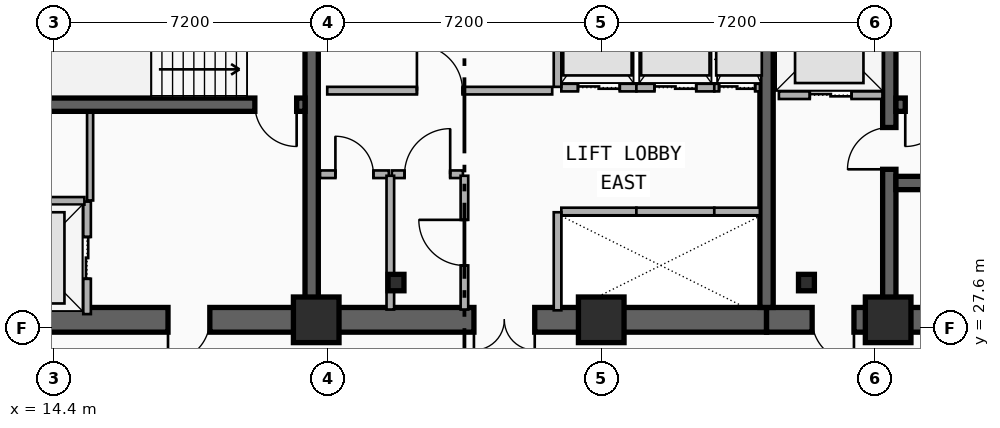
"""IFC4 building model, lengths in metres.
Left out: names, types, materials, properties, quantities, classifications, styles, units other than length and angle.
Written with IfcOpenShell. Run it as: python <this file> out.ifc"""

import sys

from ifc_helpers import new_model, si_unit, direction, frame, frame_2d, origin, origin_2d, place, context, subcontext, project, spatial, rectangle, i_section, extrude, element, fill, save


model = new_model("IFC4")
c1 = context("Model", 3, precision=1e-05, world=origin(), true_north=direction((0.0, 1.0)))
c2 = subcontext(c1, "Body", "Model", "MODEL_VIEW")
j1 = project(units=[si_unit("LENGTHUNIT", "METRE"), si_unit("PLANEANGLEUNIT", "RADIAN")], contexts=[c1])
p1 = place(None, origin())
s1 = spatial("IfcSite", under=j1, at=p1, CompositionType="ELEMENT")
p2 = place(p1, origin())
s2 = spatial("IfcBuilding", under=s1, at=p2, CompositionType="ELEMENT")
p3 = place(p2, frame((0.0, 0.0, 115.3)))
s3 = spatial("IfcBuildingStorey", under=s2, at=p3, CompositionType="ELEMENT", Elevation=115.3)
p4 = place(p3, frame((21.18, 27.82, 0.0), z_axis=(0.0, 0.0, 1.0), x_axis=(-1.0, 0.0, 0.0)))
e1 = element("IfcWall", 1, at=p4, inside=s3, PredefinedType="SHEAR", context=c2, shape_type="SweptSolid", body=[
    extrude(rectangle(XDim=9.03, YDim=0.65, at=frame_2d((4.515, 0.0))), origin(), (0.0, 0.0, 1.0), 3.5),
])
p5 = place(p4, frame((2.68, 0.0, 0.0)))
e2 = element("IfcOpeningElement", 2, at=p5, cuts=e1, PredefinedType="OPENING", context=c2, shape_type="SweptSolid", body=[
    extrude(rectangle(XDim=1.1, YDim=2.15, at=frame_2d((0.55, 1.075))), frame((0.0, 0.335, 0.0), z_axis=(0.0, -1.0, 0.0), x_axis=(1.0, 0.0, 0.0)), (0.0, 0.0, 1.0), 0.67),
])
p6 = place(p3, frame((33.15, 27.82, 0.0), z_axis=(0.0, 0.0, 1.0), x_axis=(-1.0, 0.0, 0.0)))
e3 = element("IfcWall", 3, at=p6, inside=s3, PredefinedType="SHEAR", context=c2, shape_type="SweptSolid", body=[
    extrude(rectangle(XDim=11.97, YDim=0.65, at=frame_2d((5.985, 0.0))), origin(), (0.0, 0.0, 1.0), 3.5),
])
p7 = place(p6, frame((6.1, 0.0, 0.0)))
e4 = element("IfcOpeningElement", 4, at=p7, cuts=e3, PredefinedType="OPENING", context=c2, shape_type="SweptSolid", body=[
    extrude(rectangle(XDim=1.6, YDim=2.2, at=frame_2d((0.8, 1.1))), frame((0.0, 0.335, 0.0), z_axis=(0.0, -1.0, 0.0), x_axis=(1.0, 0.0, 0.0)), (0.0, 0.0, 1.0), 0.67),
])
p8 = place(p3, frame((45.38, 27.82, 0.0), z_axis=(0.0, 0.0, 1.0), x_axis=(-1.0, 0.0, 0.0)))
e5 = element("IfcWall", 5, at=p8, inside=s3, PredefinedType="SHEAR", context=c2, shape_type="SweptSolid", body=[
    extrude(rectangle(XDim=12.23, YDim=0.65, at=frame_2d((6.115, 0.0))), origin(), (0.0, 0.0, 1.0), 3.5),
])
p9 = place(p8, frame((9.93, 0.0, 0.0)))
e6 = element("IfcOpeningElement", 6, at=p9, cuts=e5, PredefinedType="OPENING", context=c2, shape_type="SweptSolid", body=[
    extrude(rectangle(XDim=1.1, YDim=2.15, at=frame_2d((0.55, 1.075))), frame((0.0, 0.335, 0.0), z_axis=(0.0, -1.0, 0.0), x_axis=(1.0, 0.0, 0.0)), (0.0, 0.0, 1.0), 0.67),
])
p10 = place(p8, frame((6.23, 0.0, 0.0)))
e7 = element("IfcOpeningElement", 7, at=p10, cuts=e5, PredefinedType="OPENING", context=c2, shape_type="SweptSolid", body=[
    extrude(rectangle(XDim=1.1, YDim=2.15, at=frame_2d((0.55, 1.075))), frame((0.0, 0.335, 0.0), z_axis=(0.0, -1.0, 0.0), x_axis=(1.0, 0.0, 0.0)), (0.0, 0.0, 1.0), 0.67),
])
for number, where, z_axis, x_axis in (
    (8, (21.18, 28.145, 0.0), (0.0, 0.0, 1.0), (0.0, 1.0, 0.0)),
    (9, (33.15, 28.145, 0.0), (0.0, 0.0, 1.0), (0.0, 1.0, 0.0)),
):
    element("IfcWall", number, at=place(p3, frame(where, z_axis=z_axis, x_axis=x_axis)), inside=s3, PredefinedType="SHEAR", context=c2, shape_type="SweptSolid", body=[
        extrude(rectangle(XDim=8.58, YDim=0.35, at=frame_2d((4.29, 0.0))), origin(), (0.0, 0.0, 1.0), 3.5),
    ])
p11 = place(p3, frame((36.38, 28.145, 0.0), z_axis=(0.0, 0.0, 1.0), x_axis=(0.0, 1.0, 0.0)))
e10 = element("IfcWall", 10, at=p11, inside=s3, PredefinedType="SHEAR", context=c2, shape_type="SweptSolid", body=[
    extrude(rectangle(XDim=8.58, YDim=0.35, at=frame_2d((4.29, 0.0))), origin(), (0.0, 0.0, 1.0), 3.5),
])
p12 = place(p11, frame((3.635, 0.0, 0.0)))
e11 = element("IfcOpeningElement", 11, at=p12, cuts=e10, PredefinedType="OPENING", context=c2, shape_type="SweptSolid", body=[
    extrude(rectangle(XDim=1.1, YDim=2.15, at=frame_2d((0.55, 1.075))), frame((0.0, 0.185, 0.0), z_axis=(0.0, -1.0, 0.0), x_axis=(1.0, 0.0, 0.0)), (0.0, 0.0, 1.0), 0.37),
])
p13 = place(p3, frame((21.005, 33.48, 0.0), z_axis=(0.0, 0.0, 1.0), x_axis=(-1.0, 0.0, 0.0)))
e12 = element("IfcWall", 12, at=p13, inside=s3, PredefinedType="SHEAR", context=c2, shape_type="SweptSolid", body=[
    extrude(rectangle(XDim=8.53, YDim=0.35, at=frame_2d((4.265, 0.0))), origin(), (0.0, 0.0, 1.0), 3.5),
])
p14 = place(p13, frame((0.22, 0.0, 0.0)))
e13 = element("IfcOpeningElement", 13, at=p14, cuts=e12, PredefinedType="OPENING", context=c2, shape_type="SweptSolid", body=[
    extrude(rectangle(XDim=1.1, YDim=2.15, at=frame_2d((0.55, 1.075))), frame((0.0, 0.185, 0.0), z_axis=(0.0, -1.0, 0.0), x_axis=(1.0, 0.0, 0.0)), (0.0, 0.0, 1.0), 0.37),
])
p15 = place(p3, frame((45.055, 33.48, 0.0), z_axis=(0.0, 0.0, 1.0), x_axis=(-1.0, 0.0, 0.0)))
e14 = element("IfcWall", 14, at=p15, inside=s3, PredefinedType="SHEAR", context=c2, shape_type="SweptSolid", body=[
    extrude(rectangle(XDim=8.5, YDim=0.35, at=frame_2d((4.25, 0.0))), origin(), (0.0, 0.0, 1.0), 3.5),
])
p16 = place(p15, frame((7.155, 0.0, 0.0)))
e15 = element("IfcOpeningElement", 15, at=p16, cuts=e14, PredefinedType="OPENING", context=c2, shape_type="SweptSolid", body=[
    extrude(rectangle(XDim=1.1, YDim=2.15, at=frame_2d((0.55, 1.075))), frame((0.0, 0.185, 0.0), z_axis=(0.0, -1.0, 0.0), x_axis=(1.0, 0.0, 0.0)), (0.0, 0.0, 1.0), 0.37),
])
p17 = place(p3, frame((36.555, 31.42, 0.0), z_axis=(0.0, 0.0, 1.0), x_axis=(1.0, 0.0, 0.0)))
e16 = element("IfcWall", 16, at=p17, inside=s3, PredefinedType="SHEAR", context=c2, shape_type="SweptSolid", body=[
    extrude(rectangle(XDim=8.5, YDim=0.35, at=frame_2d((4.25, 0.0))), origin(), (0.0, 0.0, 1.0), 3.5),
])
for number, where, z_axis, x_axis in (
    (17, (23.4, 28.8, 0.0), (0.0, 0.0, 1.0), (1.0, 0.0, 0.0)),
    (18, (34.2, 28.8, 0.0), (0.0, 0.0, 1.0), (1.0, 0.0, 0.0)),
):
    element("IfcColumn", number, at=place(p3, frame(where, z_axis=z_axis, x_axis=x_axis)), inside=s3, PredefinedType="COLUMN", context=c2, shape_type="SweptSolid", body=[
        extrude(i_section(OverallWidth=0.418, OverallDepth=0.432, WebThickness=0.035, FlangeThickness=0.056, FilletRadius=0.015, at=origin_2d()), origin(), (0.0, 0.0, 1.0), 3.5),
    ])
for number, where, z_axis, x_axis in (
    (19, (21.3, 27.82, 0.0), (0.0, 0.0, 1.0), (1.0, 0.0, 0.0)),
    (20, (28.8, 27.82, 0.0), (0.0, 0.0, 1.0), (1.0, 0.0, 0.0)),
    (21, (36.35, 27.82, 0.0), (0.0, 0.0, 1.0), (1.0, 0.0, 0.0)),
):
    element("IfcColumn", number, at=place(p3, frame(where, z_axis=z_axis, x_axis=x_axis)), inside=s3, PredefinedType="COLUMN", context=c2, shape_type="SweptSolid", body=[
        extrude(rectangle(XDim=1.2, YDim=1.2, at=origin_2d()), origin(), (0.0, 0.0, 1.0), 3.5),
    ])
p18 = place(p3, frame((15.27, 27.97, 0.0), z_axis=(0.0, 0.0, 1.0), x_axis=(0.0, 1.0, 0.0)))
e22 = element("IfcWall", 22, at=p18, inside=s3, PredefinedType="PARTITIONING", context=c2, shape_type="SweptSolid", body=[
    extrude(rectangle(XDim=2.96, YDim=0.2, at=frame_2d((1.48, 0.0))), origin(), (0.0, 0.0, 1.0), 2.212),
])
p19 = place(p18, frame((0.93, 0.0, 0.0)))
e23 = element("IfcOpeningElement", 23, at=p19, cuts=e22, PredefinedType="OPENING", context=c2, shape_type="SweptSolid", body=[
    extrude(rectangle(XDim=1.1, YDim=2.15, at=frame_2d((0.55, 1.075))), frame((0.0, 0.11, 0.0), z_axis=(0.0, -1.0, 0.0), x_axis=(1.0, 0.0, 0.0)), (0.0, 0.0, 1.0), 0.22),
])
p20 = place(p3, frame((12.45, 30.95, 0.0), z_axis=(0.0, 0.0, 1.0), x_axis=(1.0, 0.0, 0.0)))
e24 = element("IfcWall", 24, at=p20, inside=s3, PredefinedType="PARTITIONING", context=c2, shape_type="SweptSolid", body=[
    extrude(rectangle(XDim=2.75, YDim=0.2, at=frame_2d((1.375, 0.0))), origin(), (0.0, 0.0, 1.0), 2.212),
])
p21 = place(p3, frame((33.475, 33.73, 0.0), z_axis=(0.0, 0.0, 1.0), x_axis=(1.0, 0.0, 0.0)))
e25 = element("IfcWall", 25, at=p21, inside=s3, PredefinedType="PARTITIONING", context=c2, shape_type="SweptSolid", body=[
    extrude(rectangle(XDim=2.725, YDim=0.2, at=frame_2d((1.362, 0.0))), origin(), (0.0, 0.0, 1.0), 2.212),
])
p22 = place(p21, frame((0.812, 0.0, 0.0)))
e26 = element("IfcOpeningElement", 26, at=p22, cuts=e25, PredefinedType="OPENING", context=c2, shape_type="SweptSolid", body=[
    extrude(rectangle(XDim=1.1, YDim=2.15, at=frame_2d((0.55, 1.075))), frame((0.0, 0.11, 0.0), z_axis=(0.0, -1.0, 0.0), x_axis=(1.0, 0.0, 0.0)), (0.0, 0.0, 1.0), 0.22),
])
p23 = place(p3, frame((27.75, 30.67, 0.0), z_axis=(0.0, 0.0, 1.0), x_axis=(1.0, 0.0, 0.0)))
e27 = element("IfcWall", 27, at=p23, inside=s3, PredefinedType="PARTITIONING", context=c2, shape_type="SweptSolid", body=[
    extrude(rectangle(XDim=1.975, YDim=0.2, at=frame_2d((0.988, 0.0))), origin(), (0.0, 0.0, 1.0), 2.212),
])
p24 = place(p3, frame((27.65, 28.07, 0.0), z_axis=(0.0, 0.0, 1.0), x_axis=(0.0, 1.0, 0.0)))
e28 = element("IfcWall", 28, at=p24, inside=s3, PredefinedType="PARTITIONING", context=c2, shape_type="SweptSolid", body=[
    extrude(rectangle(XDim=2.58, YDim=0.2, at=frame_2d((1.29, 0.0))), origin(), (0.0, 0.0, 1.0), 2.212),
])
p25 = place(p3, frame((29.725, 30.67, 0.0), z_axis=(0.0, 0.0, 1.0), x_axis=(1.0, 0.0, 0.0)))
e29 = element("IfcWall", 29, at=p25, inside=s3, PredefinedType="PARTITIONING", context=c2, shape_type="SweptSolid", body=[
    extrude(rectangle(XDim=2.05, YDim=0.2, at=frame_2d((1.025, 0.0))), origin(), (0.0, 0.0, 1.0), 2.62),
])
p26 = place(p3, frame((31.775, 30.67, 0.0), z_axis=(0.0, 0.0, 1.0), x_axis=(1.0, 0.0, 0.0)))
e30 = element("IfcWall", 30, at=p26, inside=s3, PredefinedType="PARTITIONING", context=c2, shape_type="SweptSolid", body=[
    extrude(rectangle(XDim=1.2, YDim=0.2, at=frame_2d((0.6, 0.0))), origin(), (0.0, 0.0, 1.0), 2.62),
])
p27 = place(p3, frame((27.75, 33.93, 0.0), z_axis=(0.0, 0.0, 1.0), x_axis=(1.0, 0.0, 0.0)))
e31 = element("IfcWall", 31, at=p27, inside=s3, PredefinedType="PARTITIONING", context=c2, shape_type="SweptSolid", body=[
    extrude(rectangle(XDim=1.975, YDim=0.2, at=frame_2d((0.988, 0.0))), origin(), (0.0, 0.0, 1.0), 2.212),
])
p28 = place(p27, frame((0.438, 0.0, 0.0)))
e32 = element("IfcOpeningElement", 32, at=p28, cuts=e31, PredefinedType="OPENING", context=c2, shape_type="SweptSolid", body=[
    extrude(rectangle(XDim=1.1, YDim=2.15, at=frame_2d((0.55, 1.075))), frame((0.0, 0.11, 0.0), z_axis=(0.0, -1.0, 0.0), x_axis=(1.0, 0.0, 0.0)), (0.0, 0.0, 1.0), 0.22),
])
p29 = place(p3, frame((27.65, 33.95, 0.0), z_axis=(0.0, 0.0, 1.0), x_axis=(0.0, 1.0, 0.0)))
e33 = element("IfcWall", 33, at=p29, inside=s3, PredefinedType="PARTITIONING", context=c2, shape_type="SweptSolid", body=[
    extrude(rectangle(XDim=2.68, YDim=0.2, at=frame_2d((1.34, 0.0))), origin(), (0.0, 0.0, 1.0), 2.212),
])
p30 = place(p3, frame((29.725, 33.93, 0.0), z_axis=(0.0, 0.0, 1.0), x_axis=(1.0, 0.0, 0.0)))
e34 = element("IfcWall", 34, at=p30, inside=s3, PredefinedType="PARTITIONING", context=c2, shape_type="SweptSolid", body=[
    extrude(rectangle(XDim=2.05, YDim=0.2, at=frame_2d((1.025, 0.0))), origin(), (0.0, 0.0, 1.0), 3.24),
])
p31 = place(p30, frame((0.475, 0.0, 0.0)))
e35 = element("IfcOpeningElement", 35, at=p31, cuts=e34, PredefinedType="OPENING", context=c2, shape_type="SweptSolid", body=[
    extrude(rectangle(XDim=1.1, YDim=2.15, at=frame_2d((0.55, 1.075))), frame((0.0, 0.11, 0.0), z_axis=(0.0, -1.0, 0.0), x_axis=(1.0, 0.0, 0.0)), (0.0, 0.0, 1.0), 0.22),
])
p32 = place(p3, frame((31.775, 33.93, 0.0), z_axis=(0.0, 0.0, 1.0), x_axis=(1.0, 0.0, 0.0)))
e36 = element("IfcWall", 36, at=p32, inside=s3, PredefinedType="PARTITIONING", context=c2, shape_type="SweptSolid", body=[
    extrude(rectangle(XDim=1.2, YDim=0.2, at=frame_2d((0.6, 0.0))), origin(), (0.0, 0.0, 1.0), 3.24),
])
p33 = place(p32, frame((0.125, 0.0, 0.0)))
e37 = element("IfcOpeningElement", 37, at=p33, cuts=e36, PredefinedType="OPENING", context=c2, shape_type="SweptSolid", body=[
    extrude(rectangle(XDim=0.95, YDim=2.15, at=frame_2d((0.475, 1.075))), frame((0.0, 0.11, 0.0), z_axis=(0.0, -1.0, 0.0), x_axis=(1.0, 0.0, 0.0)), (0.0, 0.0, 1.0), 0.22),
])
p34 = place(p3, frame((21.4, 31.65, 0.0), z_axis=(0.0, 0.0, 1.0), x_axis=(1.0, 0.0, 0.0)))
e38 = element("IfcWall", 38, at=p34, inside=s3, PredefinedType="PARTITIONING", context=c2, shape_type="SweptSolid", body=[
    extrude(rectangle(XDim=1.81, YDim=0.2, at=frame_2d((0.905, 0.0))), origin(), (0.0, 0.0, 1.0), 2.28),
])
p35 = place(p34, frame((0.405, 0.0, 0.0)))
e39 = element("IfcOpeningElement", 39, at=p35, cuts=e38, PredefinedType="OPENING", context=c2, shape_type="SweptSolid", body=[
    extrude(rectangle(XDim=1.0, YDim=2.15, at=frame_2d((0.5, 1.075))), frame((0.0, 0.11, 0.0), z_axis=(0.0, -1.0, 0.0), x_axis=(1.0, 0.0, 0.0)), (0.0, 0.0, 1.0), 0.22),
])
p36 = place(p3, frame((23.29, 31.65, 0.0), z_axis=(0.0, 0.0, 1.0), x_axis=(1.0, 0.0, 0.0)))
e40 = element("IfcWall", 40, at=p36, inside=s3, PredefinedType="PARTITIONING", context=c2, shape_type="SweptSolid", body=[
    extrude(rectangle(XDim=1.87, YDim=0.2, at=frame_2d((0.935, 0.0))), origin(), (0.0, 0.0, 1.0), 3.24),
])
p37 = place(p36, frame((0.335, 0.0, 0.0)))
e41 = element("IfcOpeningElement", 41, at=p37, cuts=e40, PredefinedType="OPENING", context=c2, shape_type="SweptSolid", body=[
    extrude(rectangle(XDim=1.2, YDim=2.15, at=frame_2d((0.6, 1.075))), frame((0.0, 0.11, 0.0), z_axis=(0.0, -1.0, 0.0), x_axis=(1.0, 0.0, 0.0)), (0.0, 0.0, 1.0), 0.22),
])
p38 = place(p3, frame((21.59, 33.85, 0.0), z_axis=(0.0, 0.0, 1.0), x_axis=(1.0, 0.0, 0.0)))
e42 = element("IfcWall", 42, at=p38, inside=s3, PredefinedType="PARTITIONING", context=c2, shape_type="SweptSolid", body=[
    extrude(rectangle(XDim=5.92, YDim=0.2, at=frame_2d((2.96, 0.0))), origin(), (0.0, 0.0, 1.0), 2.28),
])
p39 = place(p38, frame((2.36, 0.0, 0.0)))
e43 = element("IfcOpeningElement", 43, at=p39, cuts=e42, PredefinedType="OPENING", context=c2, shape_type="SweptSolid", body=[
    extrude(rectangle(XDim=1.2, YDim=2.15, at=frame_2d((0.6, 1.075))), frame((0.0, 0.11, 0.0), z_axis=(0.0, -1.0, 0.0), x_axis=(1.0, 0.0, 0.0)), (0.0, 0.0, 1.0), 0.22),
])
p40 = place(p3, frame((25.2, 28.09, 0.0), z_axis=(0.0, 0.0, 1.0), x_axis=(0.0, 1.0, 0.0)))
e44 = element("IfcWall", 44, at=p40, inside=s3, PredefinedType="PARTITIONING", context=c2, shape_type="SweptSolid", body=[
    extrude(rectangle(XDim=3.52, YDim=0.2, at=frame_2d((1.76, 0.0))), origin(), (0.0, 0.0, 1.0), 2.62),
])
p41 = place(p40, frame((1.16, 0.0, 0.0)))
e45 = element("IfcOpeningElement", 45, at=p41, cuts=e44, PredefinedType="OPENING", context=c2, shape_type="SweptSolid", body=[
    extrude(rectangle(XDim=1.2, YDim=2.15, at=frame_2d((0.6, 1.075))), frame((0.0, 0.11, 0.0), z_axis=(0.0, -1.0, 0.0), x_axis=(1.0, 0.0, 0.0)), (0.0, 0.0, 1.0), 0.22),
])
p42 = place(p3, frame((23.25, 28.09, 0.0), z_axis=(0.0, 0.0, 1.0), x_axis=(0.0, 1.0, 0.0)))
e46 = element("IfcWall", 46, at=p42, inside=s3, PredefinedType="PARTITIONING", context=c2, shape_type="SweptSolid", body=[
    extrude(rectangle(XDim=3.52, YDim=0.2, at=frame_2d((1.76, 0.0))), origin(), (0.0, 0.0, 1.0), 2.62),
])
p43 = place(p3, frame((15.35, 30.96, 0.0), z_axis=(0.0, 0.0, 1.0), x_axis=(0.0, 1.0, 0.0)))
e47 = element("IfcWall", 47, at=p43, inside=s3, PredefinedType="PARTITIONING", context=c2, shape_type="SweptSolid", body=[
    extrude(rectangle(XDim=2.31, YDim=0.16, at=frame_2d((1.155, 0.0))), origin(), (0.0, 0.0, 1.0), 3.24),
])
p44 = place(p19, origin())
e48 = element("IfcDoor", 48, at=p44, inside=s3, OperationType="DOUBLE_DOOR_SLIDING", PredefinedType="DOOR", context=c2, shape_type="SweptSolid", body=[
    extrude(rectangle(XDim=1.1, YDim=2.15, at=frame_2d((0.55, 1.075))), frame((0.0, 0.025, 0.0), z_axis=(0.0, -1.0, 0.0), x_axis=(1.0, 0.0, 0.0)), (0.0, 0.0, 1.0), 0.05),
])
fill(e23, e48)
p45 = place(p22, origin())
e49 = element("IfcDoor", 49, at=p45, inside=s3, OperationType="DOUBLE_DOOR_SLIDING", PredefinedType="DOOR", context=c2, shape_type="SweptSolid", body=[
    extrude(rectangle(XDim=1.1, YDim=2.15, at=frame_2d((0.55, 1.075))), frame((0.0, 0.025, 0.0), z_axis=(0.0, -1.0, 0.0), x_axis=(1.0, 0.0, 0.0)), (0.0, 0.0, 1.0), 0.05),
])
fill(e26, e49)
p46 = place(p28, origin())
e50 = element("IfcDoor", 50, at=p46, inside=s3, OperationType="DOUBLE_DOOR_SLIDING", PredefinedType="DOOR", context=c2, shape_type="SweptSolid", body=[
    extrude(rectangle(XDim=1.1, YDim=2.15, at=frame_2d((0.55, 1.075))), frame((0.0, 0.025, 0.0), z_axis=(0.0, -1.0, 0.0), x_axis=(1.0, 0.0, 0.0)), (0.0, 0.0, 1.0), 0.05),
])
fill(e32, e50)
p47 = place(p31, origin())
e51 = element("IfcDoor", 51, at=p47, inside=s3, OperationType="DOUBLE_DOOR_SLIDING", PredefinedType="DOOR", context=c2, shape_type="SweptSolid", body=[
    extrude(rectangle(XDim=1.1, YDim=2.15, at=frame_2d((0.55, 1.075))), frame((0.0, 0.025, 0.0), z_axis=(0.0, -1.0, 0.0), x_axis=(1.0, 0.0, 0.0)), (0.0, 0.0, 1.0), 0.05),
])
fill(e35, e51)
p48 = place(p33, origin())
e52 = element("IfcDoor", 52, at=p48, inside=s3, OperationType="DOUBLE_DOOR_SLIDING", PredefinedType="DOOR", context=c2, shape_type="SweptSolid", body=[
    extrude(rectangle(XDim=0.95, YDim=2.15, at=frame_2d((0.475, 1.075))), frame((0.0, 0.025, 0.0), z_axis=(0.0, -1.0, 0.0), x_axis=(1.0, 0.0, 0.0)), (0.0, 0.0, 1.0), 0.05),
])
fill(e37, e52)
p49 = place(p14, origin())
e53 = element("IfcDoor", 53, at=p49, inside=s3, OperationType="SINGLE_SWING_LEFT", PredefinedType="DOOR", context=c2, shape_type="SweptSolid", body=[
    extrude(rectangle(XDim=1.1, YDim=2.15, at=frame_2d((0.55, 1.075))), frame((0.0, 0.025, 0.0), z_axis=(0.0, -1.0, 0.0), x_axis=(1.0, 0.0, 0.0)), (0.0, 0.0, 1.0), 0.05),
])
fill(e13, e53)
p50 = place(p5, origin())
e54 = element("IfcDoor", 54, at=p50, inside=s3, OperationType="SINGLE_SWING_RIGHT", PredefinedType="DOOR", context=c2, shape_type="SweptSolid", body=[
    extrude(rectangle(XDim=1.1, YDim=2.15, at=frame_2d((0.55, 1.075))), frame((0.0, 0.025, 0.0), z_axis=(0.0, -1.0, 0.0), x_axis=(1.0, 0.0, 0.0)), (0.0, 0.0, 1.0), 0.05),
])
fill(e2, e54)
p51 = place(p16, origin())
e55 = element("IfcDoor", 55, at=p51, inside=s3, OperationType="SINGLE_SWING_RIGHT", PredefinedType="DOOR", context=c2, shape_type="SweptSolid", body=[
    extrude(rectangle(XDim=1.1, YDim=2.15, at=frame_2d((0.55, 1.075))), frame((0.0, 0.025, 0.0), z_axis=(0.0, -1.0, 0.0), x_axis=(1.0, 0.0, 0.0)), (0.0, 0.0, 1.0), 0.05),
])
fill(e15, e55)
p52 = place(p12, origin())
e56 = element("IfcDoor", 56, at=p52, inside=s3, OperationType="SINGLE_SWING_LEFT", PredefinedType="DOOR", context=c2, shape_type="SweptSolid", body=[
    extrude(rectangle(XDim=1.1, YDim=2.15, at=frame_2d((0.55, 1.075))), frame((0.0, 0.025, 0.0), z_axis=(0.0, -1.0, 0.0), x_axis=(1.0, 0.0, 0.0)), (0.0, 0.0, 1.0), 0.05),
])
fill(e11, e56)
p53 = place(p9, origin())
e57 = element("IfcDoor", 57, at=p53, inside=s3, OperationType="SINGLE_SWING_LEFT", PredefinedType="DOOR", context=c2, shape_type="SweptSolid", body=[
    extrude(rectangle(XDim=1.1, YDim=2.15, at=frame_2d((0.55, 1.075))), frame((0.0, 0.025, 0.0), z_axis=(0.0, -1.0, 0.0), x_axis=(1.0, 0.0, 0.0)), (0.0, 0.0, 1.0), 0.05),
])
fill(e6, e57)
p54 = place(p7, origin())
e58 = element("IfcDoor", 58, at=p54, inside=s3, OperationType="SINGLE_SWING_LEFT", PredefinedType="DOOR", context=c2, shape_type="SweptSolid", body=[
    extrude(rectangle(XDim=1.6, YDim=2.2, at=frame_2d((0.8, 1.1))), frame((0.0, 0.025, 0.0), z_axis=(0.0, -1.0, 0.0), x_axis=(1.0, 0.0, 0.0)), (0.0, 0.0, 1.0), 0.05),
])
fill(e4, e58)
p55 = place(p35, origin())
e59 = element("IfcDoor", 59, at=p55, inside=s3, OperationType="SINGLE_SWING_LEFT", PredefinedType="DOOR", context=c2, shape_type="SweptSolid", body=[
    extrude(rectangle(XDim=1.0, YDim=2.15, at=frame_2d((0.5, 1.075))), frame((0.0, 0.025, 0.0), z_axis=(0.0, -1.0, 0.0), x_axis=(1.0, 0.0, 0.0)), (0.0, 0.0, 1.0), 0.05),
])
fill(e39, e59)
p56 = place(p37, origin())
e60 = element("IfcDoor", 60, at=p56, inside=s3, OperationType="SINGLE_SWING_RIGHT", PredefinedType="DOOR", context=c2, shape_type="SweptSolid", body=[
    extrude(rectangle(XDim=1.2, YDim=2.15, at=frame_2d((0.6, 1.075))), frame((0.0, 0.025, 0.0), z_axis=(0.0, -1.0, 0.0), x_axis=(1.0, 0.0, 0.0)), (0.0, 0.0, 1.0), 0.05),
])
fill(e41, e60)
p57 = place(p39, origin())
e61 = element("IfcDoor", 61, at=p57, inside=s3, OperationType="SINGLE_SWING_LEFT", PredefinedType="DOOR", context=c2, shape_type="SweptSolid", body=[
    extrude(rectangle(XDim=1.2, YDim=2.15, at=frame_2d((0.6, 1.075))), frame((0.0, 0.025, 0.0), z_axis=(0.0, -1.0, 0.0), x_axis=(1.0, 0.0, 0.0)), (0.0, 0.0, 1.0), 0.05),
])
fill(e43, e61)
p58 = place(p41, origin())
e62 = element("IfcDoor", 62, at=p58, inside=s3, OperationType="SINGLE_SWING_RIGHT", PredefinedType="DOOR", context=c2, shape_type="SweptSolid", body=[
    extrude(rectangle(XDim=1.2, YDim=2.15, at=frame_2d((0.6, 1.075))), frame((0.0, 0.025, 0.0), z_axis=(0.0, -1.0, 0.0), x_axis=(1.0, 0.0, 0.0)), (0.0, 0.0, 1.0), 0.05),
])
fill(e45, e62)
save(model, sys.argv[1])
